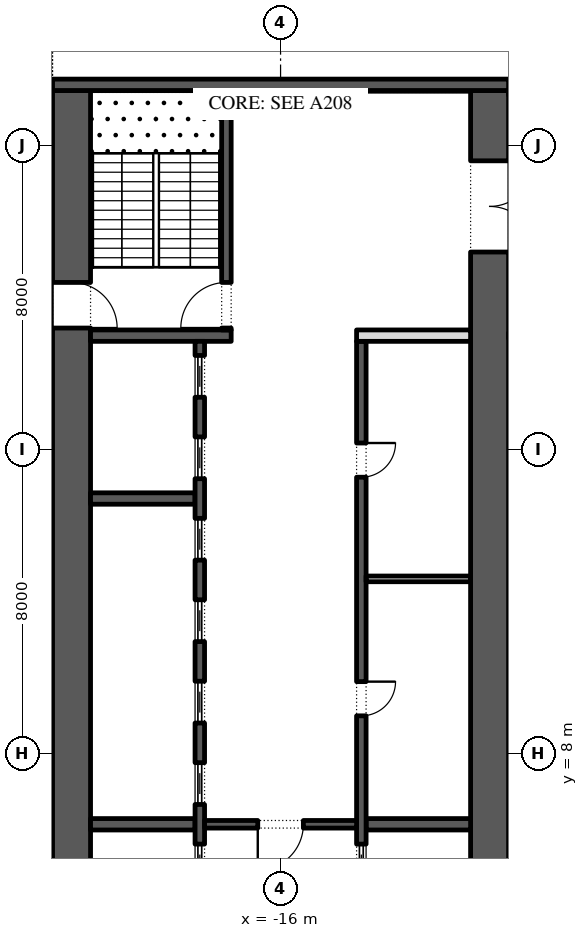
"""IFC4 building model, lengths in metres.
Left out: names, types, materials, properties, quantities, classifications, styles, units other than length and angle.
Written with IfcOpenShell. Run it as: python <this file> out.ifc"""

import sys

from ifc_helpers import new_model, si_unit, direction, frame, frame_2d, origin, place, context, subcontext, project, spatial, rectangle, extrude, element, fill, save


model = new_model("IFC4")
c1 = context("Model", 3, precision=1e-05, world=origin(), true_north=direction((0.0, 1.0)))
c2 = subcontext(c1, "Body", "Model", "MODEL_VIEW")
j1 = project(units=[si_unit("LENGTHUNIT", "METRE"), si_unit("PLANEANGLEUNIT", "RADIAN")], contexts=[c1])
p1 = place(None, origin())
s1 = spatial("IfcSite", under=j1, at=p1, CompositionType="ELEMENT")
p2 = place(p1, origin())
s2 = spatial("IfcBuilding", under=s1, at=p2, CompositionType="ELEMENT")
p3 = place(p2, frame((0.0, 0.0, 28.8)))
s3 = spatial("IfcBuildingStorey", under=s2, at=p3, CompositionType="ELEMENT", Elevation=28.8)
p4 = place(p3, frame((-21.5, -2.45, 0.0), z_axis=(0.0, 0.0, 1.0), x_axis=(0.0, 1.0, 0.0)))
e1 = element("IfcWall", 1, at=p4, inside=s3, PredefinedType="SHEAR", context=c2, shape_type="SweptSolid", body=[
    extrude(rectangle(XDim=27.9, YDim=1.0, at=frame_2d((13.95, 0.0))), origin(), (0.0, 0.0, 1.0), 4.35),
])
p5 = place(p4, frame((5.05, 0.0, 0.0)))
e2 = element("IfcOpeningElement", 2, at=p5, cuts=e1, PredefinedType="OPENING", context=c2, shape_type="SweptSolid", body=[
    extrude(rectangle(XDim=1.2, YDim=2.1, at=frame_2d((0.6, 1.05))), frame((0.0, 0.51, 0.0), z_axis=(0.0, -1.0, 0.0), x_axis=(1.0, 0.0, 0.0)), (0.0, 0.0, 1.0), 1.02),
])
p6 = place(p4, frame((21.65, 0.0, 0.0)))
e3 = element("IfcOpeningElement", 3, at=p6, cuts=e1, PredefinedType="OPENING", context=c2, shape_type="SweptSolid", body=[
    extrude(rectangle(XDim=1.2, YDim=2.1, at=frame_2d((0.6, 1.05))), frame((0.0, 0.51, 0.0), z_axis=(0.0, -1.0, 0.0), x_axis=(1.0, 0.0, 0.0)), (0.0, 0.0, 1.0), 1.02),
])
p7 = place(p3, frame((-10.5, -2.45, 0.0), z_axis=(0.0, 0.0, 1.0), x_axis=(0.0, 1.0, 0.0)))
e4 = element("IfcWall", 4, at=p7, inside=s3, PredefinedType="SHEAR", context=c2, shape_type="SweptSolid", body=[
    extrude(rectangle(XDim=27.9, YDim=1.0, at=frame_2d((13.95, 0.0))), origin(), (0.0, 0.0, 1.0), 4.35),
])
p8 = place(p7, frame((23.65, 0.0, 0.0)))
e5 = element("IfcOpeningElement", 5, at=p8, cuts=e4, PredefinedType="OPENING", context=c2, shape_type="SweptSolid", body=[
    extrude(rectangle(XDim=2.4, YDim=2.1, at=frame_2d((1.2, 1.05))), frame((0.0, 0.51, 0.0), z_axis=(0.0, -1.0, 0.0), x_axis=(1.0, 0.0, 0.0)), (0.0, 0.0, 1.0), 1.02),
])
p9 = place(p7, frame((1.387, 0.0, 0.0)))
e6 = element("IfcOpeningElement", 6, at=p9, cuts=e4, PredefinedType="OPENING", context=c2, shape_type="SweptSolid", body=[
    extrude(rectangle(XDim=0.9, YDim=2.1, at=frame_2d((0.45, 1.05))), frame((0.0, 0.51, 0.0), z_axis=(0.0, -1.0, 0.0), x_axis=(1.0, 0.0, 0.0)), (0.0, 0.0, 1.0), 1.02),
])
p10 = place(p7, frame((4.613, 0.0, 0.0)))
e7 = element("IfcOpeningElement", 7, at=p10, cuts=e4, PredefinedType="OPENING", context=c2, shape_type="SweptSolid", body=[
    extrude(rectangle(XDim=0.9, YDim=2.1, at=frame_2d((0.45, 1.05))), frame((0.0, 0.51, 0.0), z_axis=(0.0, -1.0, 0.0), x_axis=(1.0, 0.0, 0.0)), (0.0, 0.0, 1.0), 1.02),
])
p11 = place(p3, frame((-22.0, 25.6, 0.0), z_axis=(0.0, 0.0, 1.0), x_axis=(1.0, 0.0, 0.0)))
e8 = element("IfcWall", 8, at=p11, inside=s3, PredefinedType="SHEAR", context=c2, shape_type="SweptSolid", body=[
    extrude(rectangle(XDim=12.0, YDim=0.3, at=frame_2d((6.0, 0.0))), origin(), (0.0, 0.0, 1.0), 4.35),
])
p12 = place(p3, frame((-21.0, 19.0, 0.0), z_axis=(0.0, 0.0, 1.0), x_axis=(1.0, 0.0, 0.0)))
e9 = element("IfcWall", 9, at=p12, inside=s3, PredefinedType="SHEAR", context=c2, shape_type="SweptSolid", body=[
    extrude(rectangle(XDim=3.7, YDim=0.3, at=frame_2d((1.85, 0.0))), origin(), (0.0, 0.0, 1.0), 4.35),
])
p13 = place(p3, frame((-17.425, 19.15, 0.0), z_axis=(0.0, 0.0, 1.0), x_axis=(0.0, 1.0, 0.0)))
e10 = element("IfcWall", 10, at=p13, inside=s3, PredefinedType="SHEAR", context=c2, shape_type="SweptSolid", body=[
    extrude(rectangle(XDim=6.3, YDim=0.25, at=frame_2d((3.15, 0.0))), origin(), (0.0, 0.0, 1.0), 4.35),
])
p14 = place(p13, frame((0.05, 0.0, 0.0)))
e11 = element("IfcOpeningElement", 11, at=p14, cuts=e10, PredefinedType="OPENING", context=c2, shape_type="SweptSolid", body=[
    extrude(rectangle(XDim=1.2, YDim=2.1, at=frame_2d((0.6, 1.05))), frame((0.0, 0.135, 0.0), z_axis=(0.0, -1.0, 0.0), x_axis=(1.0, 0.0, 0.0)), (0.0, 0.0, 1.0), 0.27),
])
for number, where, z_axis, x_axis in (
    (12, (-21.0, 6.143, 0.0), (0.0, 0.0, 1.0), (1.0, 0.0, 0.0)),
    (13, (-21.0, 14.714, 0.0), (0.0, 0.0, 1.0), (1.0, 0.0, 0.0)),
):
    element("IfcWall", number, at=place(p3, frame(where, z_axis=z_axis, x_axis=x_axis)), inside=s3, PredefinedType="SHEAR", context=c2, shape_type="SweptSolid", body=[
        extrude(rectangle(XDim=2.75, YDim=0.3, at=frame_2d((1.375, 0.0))), origin(), (0.0, 0.0, 1.0), 4.35),
    ])
p15 = place(p3, frame((-18.125, 4.15, 0.0), z_axis=(0.0, 0.0, 1.0), x_axis=(0.0, 1.0, 0.0)))
e14 = element("IfcWall", 14, at=p15, inside=s3, PredefinedType="SHEAR", context=c2, shape_type="SweptSolid", body=[
    extrude(rectangle(XDim=14.7, YDim=0.25, at=frame_2d((7.35, 0.0))), origin(), (0.0, 0.0, 1.0), 4.35),
])
p16 = place(p15, frame((0.371, 0.0, 0.0)))
e15 = element("IfcOpeningElement", 15, at=p16, cuts=e14, PredefinedType="OPENING", context=c2, shape_type="SweptSolid", body=[
    extrude(rectangle(XDim=1.1, YDim=2.1, at=frame_2d((0.55, 1.05))), frame((0.0, 0.135, 0.0), z_axis=(0.0, -1.0, 0.0), x_axis=(1.0, 0.0, 0.0)), (0.0, 0.0, 1.0), 0.27),
])
p17 = place(p15, frame((2.514, 0.0, 0.0)))
e16 = element("IfcOpeningElement", 16, at=p17, cuts=e14, PredefinedType="OPENING", context=c2, shape_type="SweptSolid", body=[
    extrude(rectangle(XDim=1.1, YDim=2.1, at=frame_2d((0.55, 1.05))), frame((0.0, 0.135, 0.0), z_axis=(0.0, -1.0, 0.0), x_axis=(1.0, 0.0, 0.0)), (0.0, 0.0, 1.0), 0.27),
])
p18 = place(p15, frame((4.657, 0.0, 0.0)))
e17 = element("IfcOpeningElement", 17, at=p18, cuts=e14, PredefinedType="OPENING", context=c2, shape_type="SweptSolid", body=[
    extrude(rectangle(XDim=1.1, YDim=2.1, at=frame_2d((0.55, 1.05))), frame((0.0, 0.135, 0.0), z_axis=(0.0, -1.0, 0.0), x_axis=(1.0, 0.0, 0.0)), (0.0, 0.0, 1.0), 0.27),
])
p19 = place(p15, frame((6.8, 0.0, 0.0)))
e18 = element("IfcOpeningElement", 18, at=p19, cuts=e14, PredefinedType="OPENING", context=c2, shape_type="SweptSolid", body=[
    extrude(rectangle(XDim=1.1, YDim=2.1, at=frame_2d((0.55, 1.05))), frame((0.0, 0.135, 0.0), z_axis=(0.0, -1.0, 0.0), x_axis=(1.0, 0.0, 0.0)), (0.0, 0.0, 1.0), 0.27),
])
p20 = place(p15, frame((8.943, 0.0, 0.0)))
e19 = element("IfcOpeningElement", 19, at=p20, cuts=e14, PredefinedType="OPENING", context=c2, shape_type="SweptSolid", body=[
    extrude(rectangle(XDim=1.1, YDim=2.1, at=frame_2d((0.55, 1.05))), frame((0.0, 0.135, 0.0), z_axis=(0.0, -1.0, 0.0), x_axis=(1.0, 0.0, 0.0)), (0.0, 0.0, 1.0), 0.27),
])
p21 = place(p15, frame((11.086, 0.0, 0.0)))
e20 = element("IfcOpeningElement", 20, at=p21, cuts=e14, PredefinedType="OPENING", context=c2, shape_type="SweptSolid", body=[
    extrude(rectangle(XDim=1.1, YDim=2.1, at=frame_2d((0.55, 1.05))), frame((0.0, 0.135, 0.0), z_axis=(0.0, -1.0, 0.0), x_axis=(1.0, 0.0, 0.0)), (0.0, 0.0, 1.0), 0.27),
])
p22 = place(p15, frame((13.229, 0.0, 0.0)))
e21 = element("IfcOpeningElement", 21, at=p22, cuts=e14, PredefinedType="OPENING", context=c2, shape_type="SweptSolid", body=[
    extrude(rectangle(XDim=1.1, YDim=2.1, at=frame_2d((0.55, 1.05))), frame((0.0, 0.135, 0.0), z_axis=(0.0, -1.0, 0.0), x_axis=(1.0, 0.0, 0.0)), (0.0, 0.0, 1.0), 0.27),
])
p23 = place(p3, frame((-13.75, 6.143, 0.0), z_axis=(0.0, 0.0, 1.0), x_axis=(1.0, 0.0, 0.0)))
e22 = element("IfcWall", 22, at=p23, inside=s3, PredefinedType="SHEAR", context=c2, shape_type="SweptSolid", body=[
    extrude(rectangle(XDim=2.75, YDim=0.3, at=frame_2d((1.375, 0.0))), origin(), (0.0, 0.0, 1.0), 4.35),
])
p24 = place(p3, frame((-13.875, -2.45, 0.0), z_axis=(0.0, 0.0, 1.0), x_axis=(0.0, 1.0, 0.0)))
e23 = element("IfcWall", 23, at=p24, inside=s3, PredefinedType="SHEAR", context=c2, shape_type="SweptSolid", body=[
    extrude(rectangle(XDim=21.3, YDim=0.25, at=frame_2d((10.65, 0.0))), origin(), (0.0, 0.0, 1.0), 4.35),
])
p25 = place(p24, frame((11.446, 0.0, 0.0)))
e24 = element("IfcOpeningElement", 24, at=p25, cuts=e23, PredefinedType="OPENING", context=c2, shape_type="SweptSolid", body=[
    extrude(rectangle(XDim=0.9, YDim=2.1, at=frame_2d((0.45, 1.05))), frame((0.0, 0.135, 0.0), z_axis=(0.0, -1.0, 0.0), x_axis=(1.0, 0.0, 0.0)), (0.0, 0.0, 1.0), 0.27),
])
p26 = place(p24, frame((17.725, 0.0, 0.0)))
e25 = element("IfcOpeningElement", 25, at=p26, cuts=e23, PredefinedType="OPENING", context=c2, shape_type="SweptSolid", body=[
    extrude(rectangle(XDim=0.9, YDim=2.1, at=frame_2d((0.45, 1.05))), frame((0.0, 0.135, 0.0), z_axis=(0.0, -1.0, 0.0), x_axis=(1.0, 0.0, 0.0)), (0.0, 0.0, 1.0), 0.27),
])
p27 = place(p24, frame((6.971, 0.0, 0.0)))
e26 = element("IfcOpeningElement", 26, at=p27, cuts=e23, PredefinedType="OPENING", context=c2, shape_type="SweptSolid", body=[
    extrude(rectangle(XDim=1.1, YDim=2.1, at=frame_2d((0.55, 1.05))), frame((0.0, 0.135, 0.0), z_axis=(0.0, -1.0, 0.0), x_axis=(1.0, 0.0, 0.0)), (0.0, 0.0, 1.0), 0.27),
])
p28 = place(p3, frame((-14.0, 19.0, 0.0), z_axis=(0.0, 0.0, 1.0), x_axis=(1.0, 0.0, 0.0)))
e27 = element("IfcWall", 27, at=p28, inside=s3, PredefinedType="PARTITIONING", context=c2, shape_type="SweptSolid", body=[
    extrude(rectangle(XDim=3.0, YDim=0.3, at=frame_2d((1.5, 0.0))), origin(), (0.0, 0.0, 1.0), 4.35),
])
p29 = place(p3, frame((-13.75, 12.6, 0.0), z_axis=(0.0, 0.0, 1.0), x_axis=(1.0, 0.0, 0.0)))
e28 = element("IfcWall", 28, at=p29, inside=s3, PredefinedType="PARTITIONING", context=c2, shape_type="SweptSolid", body=[
    extrude(rectangle(XDim=2.75, YDim=0.15, at=frame_2d((1.375, 0.0))), origin(), (0.0, 0.0, 1.0), 4.35),
])
p30 = place(p3, frame((-18.0, 6.143, 0.0), z_axis=(0.0, 0.0, 1.0), x_axis=(1.0, 0.0, 0.0)))
e29 = element("IfcWall", 29, at=p30, inside=s3, PredefinedType="SHEAR", context=c2, shape_type="SweptSolid", body=[
    extrude(rectangle(XDim=4.0, YDim=0.2, at=frame_2d((2.0, 0.0))), origin(), (0.0, 0.0, 1.0), 4.35),
])
p31 = place(p30, frame((1.4, 0.0, 0.0)))
e30 = element("IfcOpeningElement", 30, at=p31, cuts=e29, PredefinedType="OPENING", context=c2, shape_type="SweptSolid", body=[
    extrude(rectangle(XDim=1.2, YDim=2.1, at=frame_2d((0.6, 1.05))), frame((0.0, 0.11, 0.0), z_axis=(0.0, -1.0, 0.0), x_axis=(1.0, 0.0, 0.0)), (0.0, 0.0, 1.0), 0.22),
])
p32 = place(p3, frame((-10.0, 19.0, 0.0), z_axis=(0.0, 0.0, 1.0), x_axis=(1.0, 0.0, 0.0)))
e31 = element("IfcWall", 31, at=p32, inside=s3, PredefinedType="PARTITIONING", context=c2, shape_type="SweptSolid", body=[
    extrude(rectangle(XDim=7.925, YDim=0.15, at=frame_2d((3.962, 0.0))), origin(), (0.0, 0.0, 1.0), 4.35),
])
p33 = place(p3, frame((-10.0, 25.4, 0.0), z_axis=(0.0, 0.0, 1.0), x_axis=(1.0, 0.0, 0.0)))
e32 = element("IfcWall", 32, at=p33, inside=s3, PredefinedType="PARTITIONING", context=c2, shape_type="SweptSolid", body=[
    extrude(rectangle(XDim=7.925, YDim=0.15, at=frame_2d((3.962, 0.0))), origin(), (0.0, 0.0, 1.0), 4.35),
])
p34 = place(p33, frame((3.462, 0.0, 0.0)))
e33 = element("IfcOpeningElement", 33, at=p34, cuts=e32, PredefinedType="OPENING", context=c2, shape_type="SweptSolid", body=[
    extrude(rectangle(XDim=1.0, YDim=2.1, at=frame_2d((0.5, 1.05))), frame((0.0, 0.085, 0.0), z_axis=(0.0, -1.0, 0.0), x_axis=(1.0, 0.0, 0.0)), (0.0, 0.0, 1.0), 0.17),
])
p35 = place(p16, origin())
e34 = element("IfcDoor", 34, at=p35, inside=s3, OperationType="SLIDING_TO_LEFT", PredefinedType="DOOR", context=c2, shape_type="SweptSolid", body=[
    extrude(rectangle(XDim=1.1, YDim=2.1, at=frame_2d((0.55, 1.05))), frame((0.0, 0.025, 0.0), z_axis=(0.0, -1.0, 0.0), x_axis=(1.0, 0.0, 0.0)), (0.0, 0.0, 1.0), 0.05),
])
fill(e15, e34)
p36 = place(p17, origin())
e35 = element("IfcDoor", 35, at=p36, inside=s3, OperationType="SLIDING_TO_LEFT", PredefinedType="DOOR", context=c2, shape_type="SweptSolid", body=[
    extrude(rectangle(XDim=1.1, YDim=2.1, at=frame_2d((0.55, 1.05))), frame((0.0, 0.025, 0.0), z_axis=(0.0, -1.0, 0.0), x_axis=(1.0, 0.0, 0.0)), (0.0, 0.0, 1.0), 0.05),
])
fill(e16, e35)
p37 = place(p18, origin())
e36 = element("IfcDoor", 36, at=p37, inside=s3, OperationType="SLIDING_TO_LEFT", PredefinedType="DOOR", context=c2, shape_type="SweptSolid", body=[
    extrude(rectangle(XDim=1.1, YDim=2.1, at=frame_2d((0.55, 1.05))), frame((0.0, 0.025, 0.0), z_axis=(0.0, -1.0, 0.0), x_axis=(1.0, 0.0, 0.0)), (0.0, 0.0, 1.0), 0.05),
])
fill(e17, e36)
p38 = place(p19, origin())
e37 = element("IfcDoor", 37, at=p38, inside=s3, OperationType="SLIDING_TO_LEFT", PredefinedType="DOOR", context=c2, shape_type="SweptSolid", body=[
    extrude(rectangle(XDim=1.1, YDim=2.1, at=frame_2d((0.55, 1.05))), frame((0.0, 0.025, 0.0), z_axis=(0.0, -1.0, 0.0), x_axis=(1.0, 0.0, 0.0)), (0.0, 0.0, 1.0), 0.05),
])
fill(e18, e37)
p39 = place(p20, origin())
e38 = element("IfcDoor", 38, at=p39, inside=s3, OperationType="SLIDING_TO_LEFT", PredefinedType="DOOR", context=c2, shape_type="SweptSolid", body=[
    extrude(rectangle(XDim=1.1, YDim=2.1, at=frame_2d((0.55, 1.05))), frame((0.0, 0.025, 0.0), z_axis=(0.0, -1.0, 0.0), x_axis=(1.0, 0.0, 0.0)), (0.0, 0.0, 1.0), 0.05),
])
fill(e19, e38)
p40 = place(p21, origin())
e39 = element("IfcDoor", 39, at=p40, inside=s3, OperationType="SLIDING_TO_LEFT", PredefinedType="DOOR", context=c2, shape_type="SweptSolid", body=[
    extrude(rectangle(XDim=1.1, YDim=2.1, at=frame_2d((0.55, 1.05))), frame((0.0, 0.025, 0.0), z_axis=(0.0, -1.0, 0.0), x_axis=(1.0, 0.0, 0.0)), (0.0, 0.0, 1.0), 0.05),
])
fill(e20, e39)
p41 = place(p22, origin())
e40 = element("IfcDoor", 40, at=p41, inside=s3, OperationType="SLIDING_TO_LEFT", PredefinedType="DOOR", context=c2, shape_type="SweptSolid", body=[
    extrude(rectangle(XDim=1.1, YDim=2.1, at=frame_2d((0.55, 1.05))), frame((0.0, 0.025, 0.0), z_axis=(0.0, -1.0, 0.0), x_axis=(1.0, 0.0, 0.0)), (0.0, 0.0, 1.0), 0.05),
])
fill(e21, e40)
p42 = place(p25, frame((0.9, -0.2, 0.0), z_axis=(0.0, 0.0, 1.0), x_axis=(-1.0, 0.0, 0.0)))
e41 = element("IfcDoor", 41, at=p42, inside=s3, OperationType="SINGLE_SWING_RIGHT", PredefinedType="DOOR", context=c2, shape_type="SweptSolid", body=[
    extrude(rectangle(XDim=0.9, YDim=2.1, at=frame_2d((0.45, 1.05))), frame((0.0, -0.075, 0.0), z_axis=(0.0, -1.0, 0.0), x_axis=(1.0, 0.0, 0.0)), (0.0, 0.0, 1.0), 0.05),
])
fill(e24, e41)
p43 = place(p26, frame((0.9, -0.2, 0.0), z_axis=(0.0, 0.0, 1.0), x_axis=(-1.0, 0.0, 0.0)))
e42 = element("IfcDoor", 42, at=p43, inside=s3, OperationType="SINGLE_SWING_RIGHT", PredefinedType="DOOR", context=c2, shape_type="SweptSolid", body=[
    extrude(rectangle(XDim=0.9, YDim=2.1, at=frame_2d((0.45, 1.05))), frame((0.0, -0.075, 0.0), z_axis=(0.0, -1.0, 0.0), x_axis=(1.0, 0.0, 0.0)), (0.0, 0.0, 1.0), 0.05),
])
fill(e25, e42)
p44 = place(p27, origin())
e43 = element("IfcDoor", 43, at=p44, inside=s3, OperationType="SLIDING_TO_LEFT", PredefinedType="DOOR", context=c2, shape_type="SweptSolid", body=[
    extrude(rectangle(XDim=1.1, YDim=2.1, at=frame_2d((0.55, 1.05))), frame((0.0, 0.025, 0.0), z_axis=(0.0, -1.0, 0.0), x_axis=(1.0, 0.0, 0.0)), (0.0, 0.0, 1.0), 0.05),
])
fill(e26, e43)
p45 = place(p31, frame((1.2, 0.0, 0.0), z_axis=(0.0, 0.0, 1.0), x_axis=(-1.0, 0.0, 0.0)))
e44 = element("IfcDoor", 44, at=p45, inside=s3, OperationType="SINGLE_SWING_LEFT", PredefinedType="DOOR", context=c2, shape_type="SweptSolid", body=[
    extrude(rectangle(XDim=1.2, YDim=2.1, at=frame_2d((0.6, 1.05))), frame((0.0, 0.025, 0.0), z_axis=(0.0, -1.0, 0.0), x_axis=(1.0, 0.0, 0.0)), (0.0, 0.0, 1.0), 0.05),
])
fill(e30, e44)
p46 = place(p8, frame((2.4, 0.0, 0.0), z_axis=(0.0, 0.0, 1.0), x_axis=(-1.0, 0.0, 0.0)))
e45 = element("IfcDoor", 45, at=p46, inside=s3, OperationType="DOUBLE_DOOR_SINGLE_SWING", PredefinedType="DOOR", context=c2, shape_type="SweptSolid", body=[
    extrude(rectangle(XDim=2.4, YDim=2.1, at=frame_2d((1.2, 1.05))), frame((0.0, 0.025, 0.0), z_axis=(0.0, -1.0, 0.0), x_axis=(1.0, 0.0, 0.0)), (0.0, 0.0, 1.0), 0.05),
])
fill(e5, e45)
p47 = place(p14, origin())
e46 = element("IfcDoor", 46, at=p47, inside=s3, OperationType="SINGLE_SWING_RIGHT", PredefinedType="DOOR", context=c2, shape_type="SweptSolid", body=[
    extrude(rectangle(XDim=1.2, YDim=2.1, at=frame_2d((0.6, 1.05))), frame((0.0, 0.025, 0.0), z_axis=(0.0, -1.0, 0.0), x_axis=(1.0, 0.0, 0.0)), (0.0, 0.0, 1.0), 0.05),
])
fill(e11, e46)
p48 = place(p6, frame((1.2, 0.0, 0.0), z_axis=(0.0, 0.0, 1.0), x_axis=(-1.0, 0.0, 0.0)))
e47 = element("IfcDoor", 47, at=p48, inside=s3, OperationType="SINGLE_SWING_LEFT", PredefinedType="DOOR", context=c2, shape_type="SweptSolid", body=[
    extrude(rectangle(XDim=1.2, YDim=2.1, at=frame_2d((0.6, 1.05))), frame((0.0, 0.025, 0.0), z_axis=(0.0, -1.0, 0.0), x_axis=(1.0, 0.0, 0.0)), (0.0, 0.0, 1.0), 0.05),
])
fill(e3, e47)
save(model, sys.argv[1])
